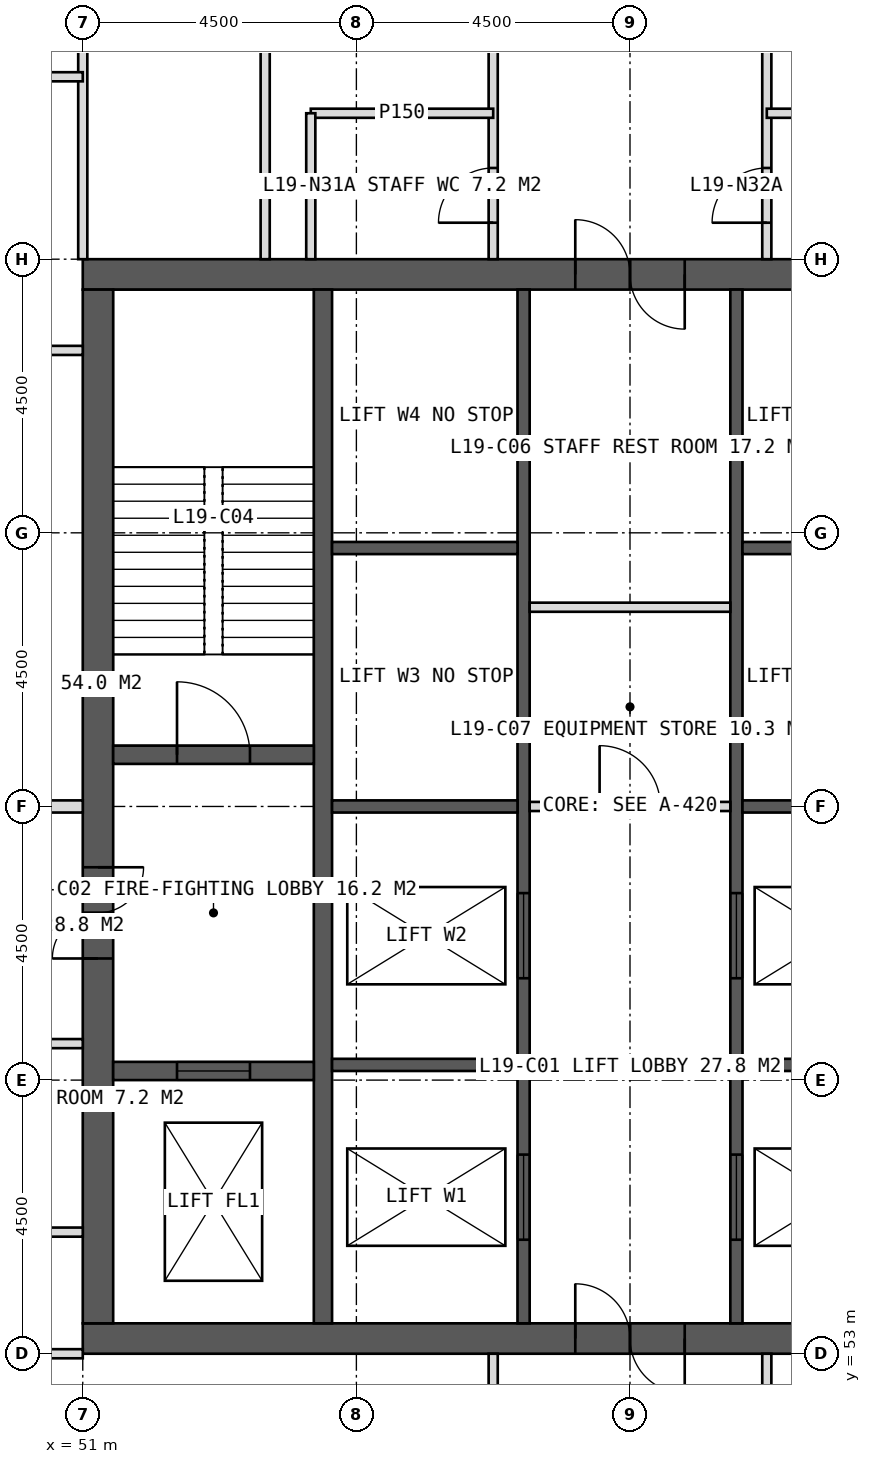
"""IFC4 building model, lengths in metres.
Left out: names, types, materials, properties, quantities, classifications, styles, units other than length and angle.
Written with IfcOpenShell. Run it as: python <this file> out.ifc"""

import sys

from ifc_helpers import new_model, si_unit, direction, frame, frame_2d, origin, place, context, subcontext, project, spatial, rectangle, extrude, element, fill, save


model = new_model("IFC4")
c1 = context("Model", 3, precision=1e-05, world=origin(), true_north=direction((0.0, 1.0)))
c2 = subcontext(c1, "Body", "Model", "MODEL_VIEW")
j1 = project(units=[si_unit("LENGTHUNIT", "METRE"), si_unit("PLANEANGLEUNIT", "RADIAN")], contexts=[c1])
p1 = place(None, origin())
s1 = spatial("IfcSite", under=j1, at=p1, CompositionType="ELEMENT")
p2 = place(p1, origin())
s2 = spatial("IfcBuilding", under=s1, at=p2, CompositionType="ELEMENT")
p3 = place(p2, frame((0.0, 0.0, 83.0)))
s3 = spatial("IfcBuildingStorey", under=s2, at=p3, CompositionType="ELEMENT", Elevation=83.0)
p4 = place(p3, frame((51.0, 70.75, 0.0), z_axis=(0.0, 0.0, 1.0), x_axis=(1.0, 0.0, 0.0)))
e1 = element("IfcWall", 1, at=p4, inside=s3, PredefinedType="SHEAR", context=c2, shape_type="SweptSolid", body=[
    extrude(rectangle(XDim=18.0, YDim=0.5, at=frame_2d((9.0, 0.0))), origin(), (0.0, 0.0, 1.0), 4.0),
])
p5 = place(p4, frame((8.1, 0.0, 0.0)))
e2 = element("IfcOpeningElement", 2, at=p5, cuts=e1, PredefinedType="OPENING", context=c2, shape_type="SweptSolid", body=[
    extrude(rectangle(XDim=1.8, YDim=2.2, at=frame_2d((0.9, 1.1))), frame((0.0, 0.26, 0.0), z_axis=(0.0, -1.0, 0.0), x_axis=(1.0, 0.0, 0.0)), (0.0, 0.0, 1.0), 0.52),
])
p6 = place(p3, frame((51.0, 53.25, 0.0), z_axis=(0.0, 0.0, 1.0), x_axis=(1.0, 0.0, 0.0)))
e3 = element("IfcWall", 3, at=p6, inside=s3, PredefinedType="SHEAR", context=c2, shape_type="SweptSolid", body=[
    extrude(rectangle(XDim=18.0, YDim=0.5, at=frame_2d((9.0, 0.0))), origin(), (0.0, 0.0, 1.0), 4.0),
])
p7 = place(p6, frame((8.1, 0.0, 0.0)))
e4 = element("IfcOpeningElement", 4, at=p7, cuts=e3, PredefinedType="OPENING", context=c2, shape_type="SweptSolid", body=[
    extrude(rectangle(XDim=1.8, YDim=2.2, at=frame_2d((0.9, 1.1))), frame((0.0, 0.26, 0.0), z_axis=(0.0, -1.0, 0.0), x_axis=(1.0, 0.0, 0.0)), (0.0, 0.0, 1.0), 0.52),
])
p8 = place(p3, frame((51.25, 53.5, 0.0), z_axis=(0.0, 0.0, 1.0), x_axis=(0.0, 1.0, 0.0)))
e5 = element("IfcWall", 5, at=p8, inside=s3, PredefinedType="SHEAR", context=c2, shape_type="SweptSolid", body=[
    extrude(rectangle(XDim=17.0, YDim=0.5, at=frame_2d((8.5, 0.0))), origin(), (0.0, 0.0, 1.0), 4.0),
])
p9 = place(p8, frame((6.0, 0.0, 0.0)))
e6 = element("IfcOpeningElement", 6, at=p9, cuts=e5, PredefinedType="OPENING", context=c2, shape_type="SweptSolid", body=[
    extrude(rectangle(XDim=1.5, YDim=2.2, at=frame_2d((0.75, 1.1))), frame((0.0, 0.26, 0.0), z_axis=(0.0, -1.0, 0.0), x_axis=(1.0, 0.0, 0.0)), (0.0, 0.0, 1.0), 0.52),
])
p10 = place(p3, frame((54.95, 53.5, 0.0), z_axis=(0.0, 0.0, 1.0), x_axis=(0.0, 1.0, 0.0)))
e7 = element("IfcWall", 7, at=p10, inside=s3, PredefinedType="SHEAR", context=c2, shape_type="SweptSolid", body=[
    extrude(rectangle(XDim=17.0, YDim=0.3, at=frame_2d((8.5, 0.0))), origin(), (0.0, 0.0, 1.0), 4.0),
])
p11 = place(p3, frame((58.25, 53.5, 0.0), z_axis=(0.0, 0.0, 1.0), x_axis=(0.0, 1.0, 0.0)))
e8 = element("IfcWall", 8, at=p11, inside=s3, PredefinedType="SHEAR", context=c2, shape_type="SweptSolid", body=[
    extrude(rectangle(XDim=17.0, YDim=0.2, at=frame_2d((8.5, 0.0))), origin(), (0.0, 0.0, 1.0), 4.0),
])
p12 = place(p11, frame((1.375, 0.0, 0.0)))
e9 = element("IfcOpeningElement", 9, at=p12, cuts=e8, PredefinedType="OPENING", context=c2, shape_type="SweptSolid", body=[
    extrude(rectangle(XDim=1.4, YDim=2.2, at=frame_2d((0.7, 1.1))), frame((0.0, 0.11, 0.0), z_axis=(0.0, -1.0, 0.0), x_axis=(1.0, 0.0, 0.0)), (0.0, 0.0, 1.0), 0.22),
])
p13 = place(p11, frame((5.675, 0.0, 0.0)))
e10 = element("IfcOpeningElement", 10, at=p13, cuts=e8, PredefinedType="OPENING", context=c2, shape_type="SweptSolid", body=[
    extrude(rectangle(XDim=1.4, YDim=2.2, at=frame_2d((0.7, 1.1))), frame((0.0, 0.11, 0.0), z_axis=(0.0, -1.0, 0.0), x_axis=(1.0, 0.0, 0.0)), (0.0, 0.0, 1.0), 0.22),
])
p14 = place(p3, frame((61.75, 53.5, 0.0), z_axis=(0.0, 0.0, 1.0), x_axis=(0.0, 1.0, 0.0)))
e11 = element("IfcWall", 11, at=p14, inside=s3, PredefinedType="SHEAR", context=c2, shape_type="SweptSolid", body=[
    extrude(rectangle(XDim=17.0, YDim=0.2, at=frame_2d((8.5, 0.0))), origin(), (0.0, 0.0, 1.0), 4.0),
])
p15 = place(p14, frame((1.375, 0.0, 0.0)))
e12 = element("IfcOpeningElement", 12, at=p15, cuts=e11, PredefinedType="OPENING", context=c2, shape_type="SweptSolid", body=[
    extrude(rectangle(XDim=1.4, YDim=2.2, at=frame_2d((0.7, 1.1))), frame((0.0, 0.11, 0.0), z_axis=(0.0, -1.0, 0.0), x_axis=(1.0, 0.0, 0.0)), (0.0, 0.0, 1.0), 0.22),
])
p16 = place(p14, frame((5.675, 0.0, 0.0)))
e13 = element("IfcOpeningElement", 13, at=p16, cuts=e11, PredefinedType="OPENING", context=c2, shape_type="SweptSolid", body=[
    extrude(rectangle(XDim=1.4, YDim=2.2, at=frame_2d((0.7, 1.1))), frame((0.0, 0.11, 0.0), z_axis=(0.0, -1.0, 0.0), x_axis=(1.0, 0.0, 0.0)), (0.0, 0.0, 1.0), 0.22),
])
for number, where, z_axis, x_axis in (
    (14, (55.1, 57.75, 0.0), (0.0, 0.0, 1.0), (1.0, 0.0, 0.0)),
    (15, (61.85, 57.75, 0.0), (0.0, 0.0, 1.0), (1.0, 0.0, 0.0)),
    (16, (55.1, 62.0, 0.0), (0.0, 0.0, 1.0), (1.0, 0.0, 0.0)),
    (17, (61.85, 62.0, 0.0), (0.0, 0.0, 1.0), (1.0, 0.0, 0.0)),
    (18, (55.1, 66.25, 0.0), (0.0, 0.0, 1.0), (1.0, 0.0, 0.0)),
    (19, (61.85, 66.25, 0.0), (0.0, 0.0, 1.0), (1.0, 0.0, 0.0)),
):
    element("IfcWall", number, at=place(p3, frame(where, z_axis=z_axis, x_axis=x_axis)), inside=s3, PredefinedType="SHEAR", context=c2, shape_type="SweptSolid", body=[
        extrude(rectangle(XDim=3.05, YDim=0.2, at=frame_2d((1.525, 0.0))), origin(), (0.0, 0.0, 1.0), 4.0),
    ])
p17 = place(p3, frame((51.5, 62.85, 0.0), z_axis=(0.0, 0.0, 1.0), x_axis=(1.0, 0.0, 0.0)))
e20 = element("IfcWall", 20, at=p17, inside=s3, PredefinedType="SHEAR", context=c2, shape_type="SweptSolid", body=[
    extrude(rectangle(XDim=3.3, YDim=0.3, at=frame_2d((1.65, 0.0))), origin(), (0.0, 0.0, 1.0), 4.0),
])
p18 = place(p17, frame((1.05, 0.0, 0.0)))
e21 = element("IfcOpeningElement", 21, at=p18, cuts=e20, PredefinedType="OPENING", context=c2, shape_type="SweptSolid", body=[
    extrude(rectangle(XDim=1.2, YDim=2.1, at=frame_2d((0.6, 1.05))), frame((0.0, 0.16, 0.0), z_axis=(0.0, -1.0, 0.0), x_axis=(1.0, 0.0, 0.0)), (0.0, 0.0, 1.0), 0.32),
])
p19 = place(p3, frame((51.5, 57.65, 0.0), z_axis=(0.0, 0.0, 1.0), x_axis=(1.0, 0.0, 0.0)))
e22 = element("IfcWall", 22, at=p19, inside=s3, PredefinedType="SHEAR", context=c2, shape_type="SweptSolid", body=[
    extrude(rectangle(XDim=3.3, YDim=0.3, at=frame_2d((1.65, 0.0))), origin(), (0.0, 0.0, 1.0), 4.0),
])
p20 = place(p19, frame((1.05, 0.0, 0.0)))
e23 = element("IfcOpeningElement", 23, at=p20, cuts=e22, PredefinedType="OPENING", context=c2, shape_type="SweptSolid", body=[
    extrude(rectangle(XDim=1.2, YDim=2.2, at=frame_2d((0.6, 1.1))), frame((0.0, 0.16, 0.0), z_axis=(0.0, -1.0, 0.0), x_axis=(1.0, 0.0, 0.0)), (0.0, 0.0, 1.0), 0.32),
])
p21 = place(p3, frame((51.0, 71.0, 0.0), z_axis=(0.0, 0.0, 1.0), x_axis=(0.0, 1.0, 0.0)))
e24 = element("IfcWall", 24, at=p21, inside=s3, PredefinedType="PARTITIONING", context=c2, shape_type="SweptSolid", body=[
    extrude(rectangle(XDim=7.2, YDim=0.15, at=frame_2d((3.6, 0.0))), origin(), (0.0, 0.0, 1.0), 3.75),
])
p22 = place(p3, frame((57.75, 71.0, 0.0), z_axis=(0.0, 0.0, 1.0), x_axis=(0.0, 1.0, 0.0)))
e25 = element("IfcWall", 25, at=p22, inside=s3, PredefinedType="PARTITIONING", context=c2, shape_type="SweptSolid", body=[
    extrude(rectangle(XDim=7.2, YDim=0.15, at=frame_2d((3.6, 0.0))), origin(), (0.0, 0.0, 1.0), 3.75),
])
p23 = place(p22, frame((0.6, 0.0, 0.0)))
e26 = element("IfcOpeningElement", 26, at=p23, cuts=e25, PredefinedType="OPENING", context=c2, shape_type="SweptSolid", body=[
    extrude(rectangle(XDim=0.9, YDim=2.1, at=frame_2d((0.45, 1.05))), frame((0.0, 0.085, 0.0), z_axis=(0.0, -1.0, 0.0), x_axis=(1.0, 0.0, 0.0)), (0.0, 0.0, 1.0), 0.17),
])
p24 = place(p3, frame((62.25, 71.0, 0.0), z_axis=(0.0, 0.0, 1.0), x_axis=(0.0, 1.0, 0.0)))
e27 = element("IfcWall", 27, at=p24, inside=s3, PredefinedType="PARTITIONING", context=c2, shape_type="SweptSolid", body=[
    extrude(rectangle(XDim=7.2, YDim=0.15, at=frame_2d((3.6, 0.0))), origin(), (0.0, 0.0, 1.0), 3.75),
])
p25 = place(p24, frame((0.6, 0.0, 0.0)))
e28 = element("IfcOpeningElement", 28, at=p25, cuts=e27, PredefinedType="OPENING", context=c2, shape_type="SweptSolid", body=[
    extrude(rectangle(XDim=0.9, YDim=2.1, at=frame_2d((0.45, 1.05))), frame((0.0, 0.085, 0.0), z_axis=(0.0, -1.0, 0.0), x_axis=(1.0, 0.0, 0.0)), (0.0, 0.0, 1.0), 0.17),
])
p26 = place(p3, frame((54.0, 71.0, 0.0), z_axis=(0.0, 0.0, 1.0), x_axis=(0.0, 1.0, 0.0)))
e29 = element("IfcWall", 29, at=p26, inside=s3, PredefinedType="PARTITIONING", context=c2, shape_type="SweptSolid", body=[
    extrude(rectangle(XDim=7.2, YDim=0.15, at=frame_2d((3.6, 0.0))), origin(), (0.0, 0.0, 1.0), 3.75),
])
p27 = place(p3, frame((54.75, 73.4, 0.0), z_axis=(0.0, 0.0, 1.0), x_axis=(1.0, 0.0, 0.0)))
e30 = element("IfcWall", 30, at=p27, inside=s3, PredefinedType="PARTITIONING", context=c2, shape_type="SweptSolid", body=[
    extrude(rectangle(XDim=3.0, YDim=0.15, at=frame_2d((1.5, 0.0))), origin(), (0.0, 0.0, 1.0), 3.75),
])
p28 = place(p3, frame((54.75, 71.0, 0.0), z_axis=(0.0, 0.0, 1.0), x_axis=(0.0, 1.0, 0.0)))
e31 = element("IfcWall", 31, at=p28, inside=s3, PredefinedType="PARTITIONING", context=c2, shape_type="SweptSolid", body=[
    extrude(rectangle(XDim=2.4, YDim=0.15, at=frame_2d((1.2, 0.0))), origin(), (0.0, 0.0, 1.0), 3.75),
])
p29 = place(p3, frame((62.25, 73.4, 0.0), z_axis=(0.0, 0.0, 1.0), x_axis=(1.0, 0.0, 0.0)))
e32 = element("IfcWall", 32, at=p29, inside=s3, PredefinedType="PARTITIONING", context=c2, shape_type="SweptSolid", body=[
    extrude(rectangle(XDim=3.0, YDim=0.15, at=frame_2d((1.5, 0.0))), origin(), (0.0, 0.0, 1.0), 3.75),
])
p30 = place(p3, frame((51.0, 53.0, 0.0), z_axis=(0.0, 0.0, 1.0), x_axis=(-1.0, 0.0, 0.0)))
e33 = element("IfcWall", 33, at=p30, inside=s3, PredefinedType="PARTITIONING", context=c2, shape_type="SweptSolid", body=[
    extrude(rectangle(XDim=7.2, YDim=0.15, at=frame_2d((3.6, 0.0))), origin(), (0.0, 0.0, 1.0), 3.75),
])
p31 = place(p3, frame((51.0, 58.1, 0.0), z_axis=(0.0, 0.0, 1.0), x_axis=(-1.0, 0.0, 0.0)))
e34 = element("IfcWall", 34, at=p31, inside=s3, PredefinedType="PARTITIONING", context=c2, shape_type="SweptSolid", body=[
    extrude(rectangle(XDim=7.2, YDim=0.15, at=frame_2d((3.6, 0.0))), origin(), (0.0, 0.0, 1.0), 3.75),
])
p32 = place(p31, frame((0.6, 0.0, 0.0)))
e35 = element("IfcOpeningElement", 35, at=p32, cuts=e34, PredefinedType="OPENING", context=c2, shape_type="SweptSolid", body=[
    extrude(rectangle(XDim=0.9, YDim=2.1, at=frame_2d((0.45, 1.05))), frame((0.0, 0.085, 0.0), z_axis=(0.0, -1.0, 0.0), x_axis=(1.0, 0.0, 0.0)), (0.0, 0.0, 1.0), 0.17),
])
p33 = place(p3, frame((51.0, 62.0, 0.0), z_axis=(0.0, 0.0, 1.0), x_axis=(-1.0, 0.0, 0.0)))
e36 = element("IfcWall", 36, at=p33, inside=s3, PredefinedType="SOLIDWALL", context=c2, shape_type="SweptSolid", body=[
    extrude(rectangle(XDim=7.2, YDim=0.2, at=frame_2d((3.6, 0.0))), origin(), (0.0, 0.0, 1.0), 2.75),
])
for number, where, z_axis, x_axis in (
    (37, (51.0, 69.5, 0.0), (0.0, 0.0, 1.0), (-1.0, 0.0, 0.0)),
    (38, (51.0, 74.0, 0.0), (0.0, 0.0, 1.0), (-1.0, 0.0, 0.0)),
):
    element("IfcWall", number, at=place(p3, frame(where, z_axis=z_axis, x_axis=x_axis)), inside=s3, PredefinedType="PARTITIONING", context=c2, shape_type="SweptSolid", body=[
        extrude(rectangle(XDim=7.2, YDim=0.15, at=frame_2d((3.6, 0.0))), origin(), (0.0, 0.0, 1.0), 3.75),
    ])
p34 = place(p3, frame((51.0, 55.0, 0.0), z_axis=(0.0, 0.0, 1.0), x_axis=(-1.0, 0.0, 0.0)))
e39 = element("IfcWall", 39, at=p34, inside=s3, PredefinedType="PARTITIONING", context=c2, shape_type="SweptSolid", body=[
    extrude(rectangle(XDim=2.4, YDim=0.15, at=frame_2d((1.2, 0.0))), origin(), (0.0, 0.0, 1.0), 3.75),
])
p35 = place(p3, frame((62.25, 53.0, 0.0), z_axis=(0.0, 0.0, 1.0), x_axis=(0.0, -1.0, 0.0)))
e40 = element("IfcWall", 40, at=p35, inside=s3, PredefinedType="PARTITIONING", context=c2, shape_type="SweptSolid", body=[
    extrude(rectangle(XDim=7.2, YDim=0.15, at=frame_2d((3.6, 0.0))), origin(), (0.0, 0.0, 1.0), 3.75),
])
p36 = place(p35, frame((0.6, 0.0, 0.0)))
e41 = element("IfcOpeningElement", 41, at=p36, cuts=e40, PredefinedType="OPENING", context=c2, shape_type="SweptSolid", body=[
    extrude(rectangle(XDim=0.9, YDim=2.1, at=frame_2d((0.45, 1.05))), frame((0.0, 0.085, 0.0), z_axis=(0.0, -1.0, 0.0), x_axis=(1.0, 0.0, 0.0)), (0.0, 0.0, 1.0), 0.17),
])
p37 = place(p3, frame((57.75, 53.0, 0.0), z_axis=(0.0, 0.0, 1.0), x_axis=(0.0, -1.0, 0.0)))
e42 = element("IfcWall", 42, at=p37, inside=s3, PredefinedType="PARTITIONING", context=c2, shape_type="SweptSolid", body=[
    extrude(rectangle(XDim=7.2, YDim=0.15, at=frame_2d((3.6, 0.0))), origin(), (0.0, 0.0, 1.0), 3.75),
])
p38 = place(p3, frame((58.35, 62.0, 0.0), z_axis=(0.0, 0.0, 1.0), x_axis=(1.0, 0.0, 0.0)))
e43 = element("IfcWall", 43, at=p38, inside=s3, PredefinedType="PARTITIONING", context=c2, shape_type="SweptSolid", body=[
    extrude(rectangle(XDim=3.3, YDim=0.15, at=frame_2d((1.65, 0.0))), origin(), (0.0, 0.0, 1.0), 3.75),
])
p39 = place(p38, frame((1.15, 0.0, 0.0)))
e44 = element("IfcOpeningElement", 44, at=p39, cuts=e43, PredefinedType="OPENING", context=c2, shape_type="SweptSolid", body=[
    extrude(rectangle(XDim=1.0, YDim=2.1, at=frame_2d((0.5, 1.05))), frame((0.0, 0.085, 0.0), z_axis=(0.0, -1.0, 0.0), x_axis=(1.0, 0.0, 0.0)), (0.0, 0.0, 1.0), 0.17),
])
p40 = place(p3, frame((58.35, 65.277, 0.0), z_axis=(0.0, 0.0, 1.0), x_axis=(1.0, 0.0, 0.0)))
e45 = element("IfcWall", 45, at=p40, inside=s3, PredefinedType="PARTITIONING", context=c2, shape_type="SweptSolid", body=[
    extrude(rectangle(XDim=3.3, YDim=0.15, at=frame_2d((1.65, 0.0))), origin(), (0.0, 0.0, 1.0), 3.75),
])
p41 = place(p23, origin())
e46 = element("IfcDoor", 46, at=p41, inside=s3, OperationType="SINGLE_SWING_LEFT", PredefinedType="DOOR", context=c2, shape_type="SweptSolid", body=[
    extrude(rectangle(XDim=0.9, YDim=2.1, at=frame_2d((0.45, 1.05))), frame((0.0, 0.025, 0.0), z_axis=(0.0, -1.0, 0.0), x_axis=(1.0, 0.0, 0.0)), (0.0, 0.0, 1.0), 0.05),
])
fill(e26, e46)
p42 = place(p25, origin())
e47 = element("IfcDoor", 47, at=p42, inside=s3, OperationType="SINGLE_SWING_LEFT", PredefinedType="DOOR", context=c2, shape_type="SweptSolid", body=[
    extrude(rectangle(XDim=0.9, YDim=2.1, at=frame_2d((0.45, 1.05))), frame((0.0, 0.025, 0.0), z_axis=(0.0, -1.0, 0.0), x_axis=(1.0, 0.0, 0.0)), (0.0, 0.0, 1.0), 0.05),
])
fill(e28, e47)
p43 = place(p7, origin())
e48 = element("IfcDoor", 48, at=p43, inside=s3, OperationType="DOUBLE_DOOR_SINGLE_SWING", PredefinedType="DOOR", context=c2, shape_type="SweptSolid", body=[
    extrude(rectangle(XDim=1.8, YDim=2.2, at=frame_2d((0.9, 1.1))), frame((0.0, 0.025, 0.0), z_axis=(0.0, -1.0, 0.0), x_axis=(1.0, 0.0, 0.0)), (0.0, 0.0, 1.0), 0.05),
])
fill(e4, e48)
p44 = place(p9, origin())
e49 = element("IfcDoor", 49, at=p44, inside=s3, OperationType="DOUBLE_DOOR_SINGLE_SWING", PredefinedType="DOOR", context=c2, shape_type="SweptSolid", body=[
    extrude(rectangle(XDim=1.5, YDim=2.2, at=frame_2d((0.75, 1.1))), frame((0.0, 0.025, 0.0), z_axis=(0.0, -1.0, 0.0), x_axis=(1.0, 0.0, 0.0)), (0.0, 0.0, 1.0), 0.05),
])
fill(e6, e49)
p45 = place(p18, origin())
e50 = element("IfcDoor", 50, at=p45, inside=s3, OperationType="SINGLE_SWING_LEFT", PredefinedType="DOOR", context=c2, shape_type="SweptSolid", body=[
    extrude(rectangle(XDim=1.2, YDim=2.1, at=frame_2d((0.6, 1.05))), frame((0.0, 0.025, 0.0), z_axis=(0.0, -1.0, 0.0), x_axis=(1.0, 0.0, 0.0)), (0.0, 0.0, 1.0), 0.05),
])
fill(e21, e50)
p46 = place(p20, origin())
e51 = element("IfcDoor", 51, at=p46, inside=s3, OperationType="SLIDING_TO_LEFT", PredefinedType="DOOR", context=c2, shape_type="SweptSolid", body=[
    extrude(rectangle(XDim=1.2, YDim=2.2, at=frame_2d((0.6, 1.1))), frame((0.0, 0.025, 0.0), z_axis=(0.0, -1.0, 0.0), x_axis=(1.0, 0.0, 0.0)), (0.0, 0.0, 1.0), 0.05),
])
fill(e23, e51)
p47 = place(p12, origin())
e52 = element("IfcDoor", 52, at=p47, inside=s3, OperationType="SLIDING_TO_LEFT", PredefinedType="DOOR", context=c2, shape_type="SweptSolid", body=[
    extrude(rectangle(XDim=1.4, YDim=2.2, at=frame_2d((0.7, 1.1))), frame((0.0, 0.025, 0.0), z_axis=(0.0, -1.0, 0.0), x_axis=(1.0, 0.0, 0.0)), (0.0, 0.0, 1.0), 0.05),
])
fill(e9, e52)
p48 = place(p15, origin())
e53 = element("IfcDoor", 53, at=p48, inside=s3, OperationType="SLIDING_TO_LEFT", PredefinedType="DOOR", context=c2, shape_type="SweptSolid", body=[
    extrude(rectangle(XDim=1.4, YDim=2.2, at=frame_2d((0.7, 1.1))), frame((0.0, 0.025, 0.0), z_axis=(0.0, -1.0, 0.0), x_axis=(1.0, 0.0, 0.0)), (0.0, 0.0, 1.0), 0.05),
])
fill(e12, e53)
p49 = place(p13, origin())
e54 = element("IfcDoor", 54, at=p49, inside=s3, OperationType="SLIDING_TO_LEFT", PredefinedType="DOOR", context=c2, shape_type="SweptSolid", body=[
    extrude(rectangle(XDim=1.4, YDim=2.2, at=frame_2d((0.7, 1.1))), frame((0.0, 0.025, 0.0), z_axis=(0.0, -1.0, 0.0), x_axis=(1.0, 0.0, 0.0)), (0.0, 0.0, 1.0), 0.05),
])
fill(e10, e54)
p50 = place(p16, origin())
e55 = element("IfcDoor", 55, at=p50, inside=s3, OperationType="SLIDING_TO_LEFT", PredefinedType="DOOR", context=c2, shape_type="SweptSolid", body=[
    extrude(rectangle(XDim=1.4, YDim=2.2, at=frame_2d((0.7, 1.1))), frame((0.0, 0.025, 0.0), z_axis=(0.0, -1.0, 0.0), x_axis=(1.0, 0.0, 0.0)), (0.0, 0.0, 1.0), 0.05),
])
fill(e13, e55)
p51 = place(p39, origin())
e56 = element("IfcDoor", 56, at=p51, inside=s3, OperationType="SINGLE_SWING_LEFT", PredefinedType="DOOR", context=c2, shape_type="SweptSolid", body=[
    extrude(rectangle(XDim=1.0, YDim=2.1, at=frame_2d((0.5, 1.05))), frame((0.0, 0.025, 0.0), z_axis=(0.0, -1.0, 0.0), x_axis=(1.0, 0.0, 0.0)), (0.0, 0.0, 1.0), 0.05),
])
fill(e44, e56)
p52 = place(p5, origin())
e57 = element("IfcDoor", 57, at=p52, inside=s3, OperationType="DOUBLE_DOOR_SINGLE_SWING", PredefinedType="DOOR", context=c2, shape_type="SweptSolid", body=[
    extrude(rectangle(XDim=1.8, YDim=2.2, at=frame_2d((0.9, 1.1))), frame((0.0, 0.025, 0.0), z_axis=(0.0, -1.0, 0.0), x_axis=(1.0, 0.0, 0.0)), (0.0, 0.0, 1.0), 0.05),
])
fill(e2, e57)
save(model, sys.argv[1])
